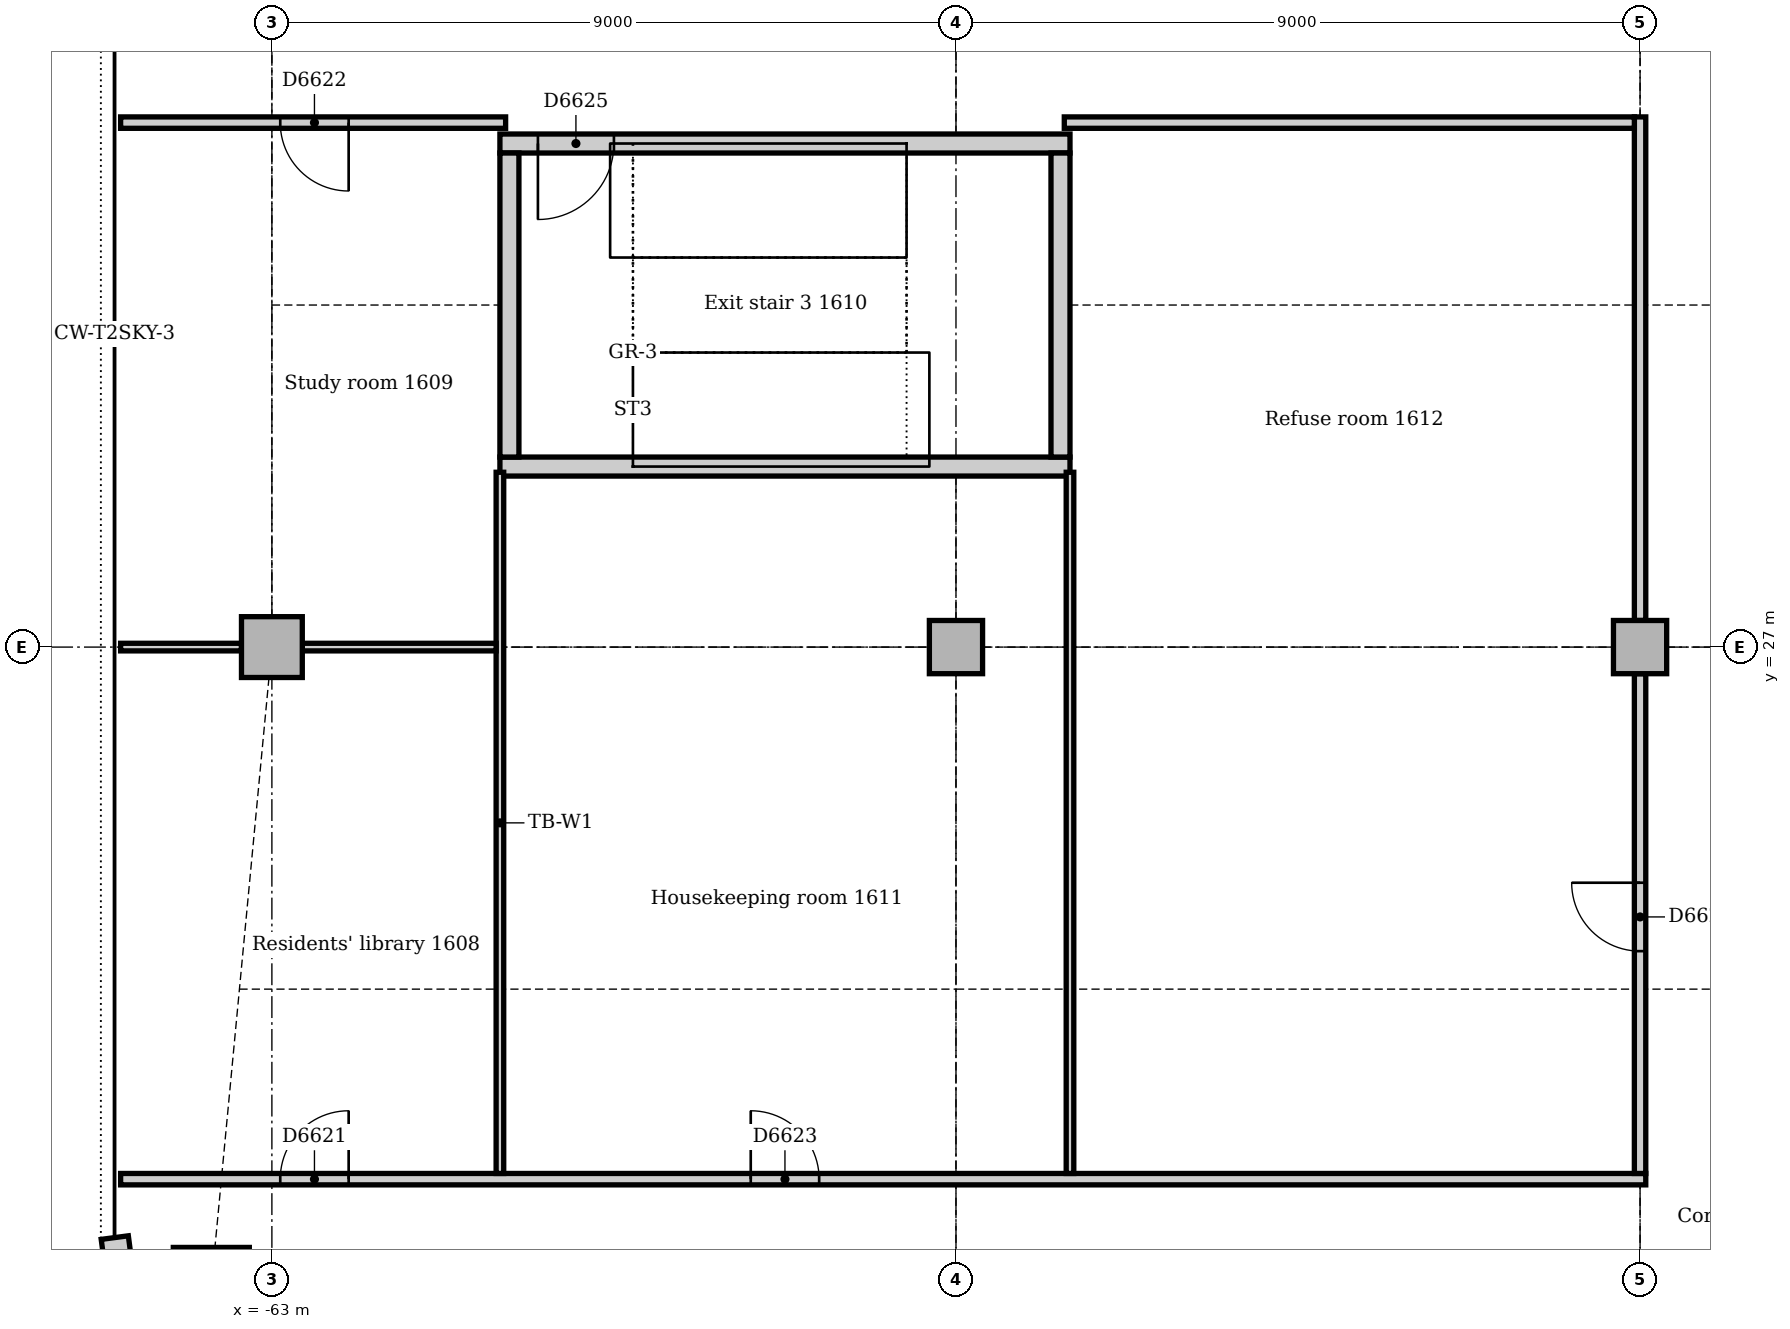
"""IFC4 building model, lengths in metres.
Left out: names, types, materials, properties, quantities, classifications, styles, units other than length and angle.
Written with IfcOpenShell. Run it as: python <this file> out.ifc"""

import sys

from ifc_helpers import new_model, si_unit, direction, frame, frame_2d, origin, origin_2d, place, context, subcontext, project, spatial, rectangle, extrude, element, fill, save


model = new_model("IFC4")
c1 = context("Model", 3, precision=1e-05, world=origin(), true_north=direction((0.0, 1.0)))
c2 = subcontext(c1, "Body", "Model", "MODEL_VIEW")
j1 = project(units=[si_unit("LENGTHUNIT", "METRE"), si_unit("PLANEANGLEUNIT", "RADIAN")], contexts=[c1])
p1 = place(None, origin())
s1 = spatial("IfcSite", under=j1, at=p1, CompositionType="ELEMENT")
p2 = place(p1, origin())
s2 = spatial("IfcBuilding", under=s1, at=p2, CompositionType="ELEMENT")
p3 = place(p2, frame((0.0, 0.0, 71.0)))
s3 = spatial("IfcBuildingStorey", under=s2, at=p3, CompositionType="ELEMENT", Elevation=71.0)
p4 = place(p3, frame((-60.0, 29.375, 0.0), z_axis=(0.0, 0.0, 1.0), x_axis=(1.0, 0.0, 0.0)))
e1 = element("IfcWall", 1, at=p4, inside=s3, PredefinedType="SOLIDWALL", context=c2, shape_type="SweptSolid", body=[
    extrude(rectangle(XDim=7.5, YDim=0.25, at=frame_2d((3.75, 0.0))), origin(), (0.0, 0.0, 1.0), 4.0),
])
p5 = place(p3, frame((-52.5, 33.625, 0.0), z_axis=(0.0, 0.0, 1.0), x_axis=(-1.0, 0.0, 0.0)))
e2 = element("IfcWall", 2, at=p5, inside=s3, PredefinedType="SOLIDWALL", context=c2, shape_type="SweptSolid", body=[
    extrude(rectangle(XDim=7.5, YDim=0.25, at=frame_2d((3.75, 0.0))), origin(), (0.0, 0.0, 1.0), 4.0),
])
p6 = place(p5, frame((6.0, 0.0, 0.0)))
e3 = element("IfcOpeningElement", 3, at=p6, cuts=e2, PredefinedType="OPENING", context=c2, shape_type="SweptSolid", body=[
    extrude(rectangle(XDim=1.0, YDim=2.1, at=frame_2d((0.5, 1.05))), frame((0.0, 0.135, 0.0), z_axis=(0.0, -1.0, 0.0), x_axis=(1.0, 0.0, 0.0)), (0.0, 0.0, 1.0), 0.27),
])
for number, where, z_axis, x_axis in (
    (4, (-52.625, 29.5, 0.0), (0.0, 0.0, 1.0), (0.0, 1.0, 0.0)),
    (5, (-59.875, 33.5, 0.0), (0.0, 0.0, 1.0), (0.0, -1.0, 0.0)),
):
    element("IfcWall", number, at=place(p3, frame(where, z_axis=z_axis, x_axis=x_axis)), inside=s3, PredefinedType="SOLIDWALL", context=c2, shape_type="SweptSolid", body=[
        extrude(rectangle(XDim=4.0, YDim=0.25, at=frame_2d((2.0, 0.0))), origin(), (0.0, 0.0, 1.0), 4.0),
    ])
p7 = place(p3, frame((-63.797, 18.602, 0.0), z_axis=(0.0, 0.0, 1.0), x_axis=(1.0, 0.0, 0.0)))
e6 = element("IfcColumn", 6, at=p7, inside=s3, PredefinedType="COLUMN", context=c2, shape_type="SweptSolid", body=[
    extrude(rectangle(XDim=1.0, YDim=1.0, at=origin_2d()), origin(), (0.0, 0.0, 1.0), 3.85),
])
p8 = place(p3, frame((-63.0, 27.0, 0.0), z_axis=(0.0, 0.0, 1.0), x_axis=(1.0, 0.0, 0.0)))
e7 = element("IfcColumn", 7, at=p8, inside=s3, PredefinedType="COLUMN", context=c2, shape_type="SweptSolid", body=[
    extrude(rectangle(XDim=0.8, YDim=0.8, at=origin_2d()), origin(), (0.0, 0.0, 1.0), 3.85),
])
for number, where, z_axis, x_axis in (
    (8, (-54.0, 27.0, 0.0), (0.0, 0.0, 1.0), (1.0, 0.0, 0.0)),
    (9, (-45.0, 27.0, 0.0), (0.0, 0.0, 1.0), (1.0, 0.0, 0.0)),
):
    element("IfcColumn", number, at=place(p3, frame(where, z_axis=z_axis, x_axis=x_axis)), inside=s3, PredefinedType="COLUMN", context=c2, shape_type="SweptSolid", body=[
        extrude(rectangle(XDim=0.7, YDim=0.7, at=origin_2d()), origin(), (0.0, 0.0, 1.0), 3.85),
    ])
p9 = place(p3, frame((-65.067, 19.231, 0.0), z_axis=(0.0, 0.0, 1.0), x_axis=(0.13055608231, -0.99144092581, 0.0)))
e10 = element("IfcWall", 10, at=p9, inside=s3, PredefinedType="STANDARD", context=c2, shape_type="SweptSolid", body=[
    extrude(rectangle(XDim=0.713, YDim=0.36, at=frame_2d((0.356, 0.0))), origin(), (0.0, 0.0, 1.0), 3.85),
])
p10 = place(p3, frame((-64.99, 20.0, 0.0), z_axis=(0.0, 0.0, 1.0), x_axis=(1.0, 0.0, 0.0)))
e11 = element("IfcWall", 11, at=p10, inside=s3, PredefinedType="PARTITIONING", context=c2, shape_type="SweptSolid", body=[
    extrude(rectangle(XDim=20.065, YDim=0.15, at=frame_2d((10.033, 0.0))), origin(), (0.0, 0.0, 1.0), 3.85),
])
p11 = place(p10, frame((2.1, 0.0, 0.0)))
e12 = element("IfcOpeningElement", 12, at=p11, cuts=e11, PredefinedType="OPENING", context=c2, shape_type="SweptSolid", body=[
    extrude(rectangle(XDim=0.9, YDim=2.1, at=frame_2d((0.45, 1.05))), frame((0.0, 0.085, 0.0), z_axis=(0.0, -1.0, 0.0), x_axis=(1.0, 0.0, 0.0)), (0.0, 0.0, 1.0), 0.17),
])
p12 = place(p10, frame((8.29, 0.0, 0.0)))
e13 = element("IfcOpeningElement", 13, at=p12, cuts=e11, PredefinedType="OPENING", context=c2, shape_type="SweptSolid", body=[
    extrude(rectangle(XDim=0.9, YDim=2.1, at=frame_2d((0.45, 1.05))), frame((0.0, 0.085, 0.0), z_axis=(0.0, -1.0, 0.0), x_axis=(1.0, 0.0, 0.0)), (0.0, 0.0, 1.0), 0.17),
])
p13 = place(p3, frame((-45.0, 20.075, 0.0), z_axis=(0.0, 0.0, 1.0), x_axis=(0.0, 1.0, 0.0)))
e14 = element("IfcWall", 14, at=p13, inside=s3, PredefinedType="PARTITIONING", context=c2, shape_type="SweptSolid", body=[
    extrude(rectangle(XDim=6.575, YDim=0.15, at=frame_2d((3.288, 0.0))), origin(), (0.0, 0.0, 1.0), 3.256),
])
p14 = place(p13, frame((2.925, 0.0, 0.0)))
e15 = element("IfcOpeningElement", 15, at=p14, cuts=e14, PredefinedType="OPENING", context=c2, shape_type="SweptSolid", body=[
    extrude(rectangle(XDim=0.9, YDim=2.1, at=frame_2d((0.45, 1.05))), frame((0.0, 0.085, 0.0), z_axis=(0.0, -1.0, 0.0), x_axis=(1.0, 0.0, 0.0)), (0.0, 0.0, 1.0), 0.17),
])
p15 = place(p3, frame((-45.0, 27.35, 0.0), z_axis=(0.0, 0.0, 1.0), x_axis=(0.0, 1.0, 0.0)))
e16 = element("IfcWall", 16, at=p15, inside=s3, PredefinedType="PARTITIONING", context=c2, shape_type="SweptSolid", body=[
    extrude(rectangle(XDim=6.625, YDim=0.15, at=frame_2d((3.312, 0.0))), origin(), (0.0, 0.0, 1.0), 3.256),
])
p16 = place(p3, frame((-52.575, 33.9, 0.0), z_axis=(0.0, 0.0, 1.0), x_axis=(1.0, 0.0, 0.0)))
e17 = element("IfcWall", 17, at=p16, inside=s3, PredefinedType="PARTITIONING", context=c2, shape_type="SweptSolid", body=[
    extrude(rectangle(XDim=7.5, YDim=0.15, at=frame_2d((3.75, 0.0))), origin(), (0.0, 0.0, 1.0), 3.85),
])
p17 = place(p3, frame((-64.99, 33.9, 0.0), z_axis=(0.0, 0.0, 1.0), x_axis=(1.0, 0.0, 0.0)))
e18 = element("IfcWall", 18, at=p17, inside=s3, PredefinedType="PARTITIONING", context=c2, shape_type="SweptSolid", body=[
    extrude(rectangle(XDim=5.065, YDim=0.15, at=frame_2d((2.533, 0.0))), origin(), (0.0, 0.0, 1.0), 3.85),
])
p18 = place(p17, frame((2.1, 0.0, 0.0)))
e19 = element("IfcOpeningElement", 19, at=p18, cuts=e18, PredefinedType="OPENING", context=c2, shape_type="SweptSolid", body=[
    extrude(rectangle(XDim=0.9, YDim=2.1, at=frame_2d((0.45, 1.05))), frame((0.0, 0.085, 0.0), z_axis=(0.0, -1.0, 0.0), x_axis=(1.0, 0.0, 0.0)), (0.0, 0.0, 1.0), 0.17),
])
for number, where, z_axis, x_axis in (
    (20, (-60.0, 20.075, 0.0), (0.0, 0.0, 1.0), (0.0, 1.0, 0.0)),
    (21, (-52.5, 20.075, 0.0), (0.0, 0.0, 1.0), (0.0, 1.0, 0.0)),
):
    element("IfcWall", number, at=place(p3, frame(where, z_axis=z_axis, x_axis=x_axis)), inside=s3, PredefinedType="PARTITIONING", context=c2, shape_type="SweptSolid", body=[
        extrude(rectangle(XDim=9.225, YDim=0.1, at=frame_2d((4.612, 0.0))), origin(), (0.0, 0.0, 1.0), 3.85),
    ])
p19 = place(p3, frame((-62.6, 27.0, 0.0), z_axis=(0.0, 0.0, 1.0), x_axis=(1.0, 0.0, 0.0)))
e22 = element("IfcWall", 22, at=p19, inside=s3, PredefinedType="PARTITIONING", context=c2, shape_type="SweptSolid", body=[
    extrude(rectangle(XDim=2.55, YDim=0.1, at=frame_2d((1.275, 0.0))), origin(), (0.0, 0.0, 1.0), 3.158),
])
p20 = place(p3, frame((-64.99, 27.0, 0.0), z_axis=(0.0, 0.0, 1.0), x_axis=(1.0, 0.0, 0.0)))
e23 = element("IfcWall", 23, at=p20, inside=s3, PredefinedType="PARTITIONING", context=c2, shape_type="SweptSolid", body=[
    extrude(rectangle(XDim=1.59, YDim=0.1, at=frame_2d((0.795, 0.0))), origin(), (0.0, 0.0, 1.0), 3.85),
])
p21 = place(p11, origin())
e24 = element("IfcDoor", 24, at=p21, inside=s3, OperationType="SINGLE_SWING_RIGHT", PredefinedType="DOOR", context=c2, shape_type="SweptSolid", body=[
    extrude(rectangle(XDim=0.9, YDim=2.1, at=frame_2d((0.45, 1.05))), frame((0.0, 0.025, 0.0), z_axis=(0.0, -1.0, 0.0), x_axis=(1.0, 0.0, 0.0)), (0.0, 0.0, 1.0), 0.05),
])
fill(e12, e24)
p22 = place(p18, frame((0.9, 0.0, 0.0), z_axis=(0.0, 0.0, 1.0), x_axis=(-1.0, 0.0, 0.0)))
e25 = element("IfcDoor", 25, at=p22, inside=s3, OperationType="SINGLE_SWING_LEFT", PredefinedType="DOOR", context=c2, shape_type="SweptSolid", body=[
    extrude(rectangle(XDim=0.9, YDim=2.1, at=frame_2d((0.45, 1.05))), frame((0.0, 0.025, 0.0), z_axis=(0.0, -1.0, 0.0), x_axis=(1.0, 0.0, 0.0)), (0.0, 0.0, 1.0), 0.05),
])
fill(e19, e25)
p23 = place(p12, origin())
e26 = element("IfcDoor", 26, at=p23, inside=s3, OperationType="SINGLE_SWING_LEFT", PredefinedType="DOOR", context=c2, shape_type="SweptSolid", body=[
    extrude(rectangle(XDim=0.9, YDim=2.1, at=frame_2d((0.45, 1.05))), frame((0.0, 0.025, 0.0), z_axis=(0.0, -1.0, 0.0), x_axis=(1.0, 0.0, 0.0)), (0.0, 0.0, 1.0), 0.05),
])
fill(e13, e26)
p24 = place(p14, origin())
e27 = element("IfcDoor", 27, at=p24, inside=s3, OperationType="SINGLE_SWING_RIGHT", PredefinedType="DOOR", context=c2, shape_type="SweptSolid", body=[
    extrude(rectangle(XDim=0.9, YDim=2.1, at=frame_2d((0.45, 1.05))), frame((0.0, 0.025, 0.0), z_axis=(0.0, -1.0, 0.0), x_axis=(1.0, 0.0, 0.0)), (0.0, 0.0, 1.0), 0.05),
])
fill(e15, e27)
p25 = place(p6, origin())
e28 = element("IfcDoor", 28, at=p25, inside=s3, OperationType="SINGLE_SWING_RIGHT", PredefinedType="DOOR", context=c2, shape_type="SweptSolid", body=[
    extrude(rectangle(XDim=1.0, YDim=2.1, at=frame_2d((0.5, 1.05))), frame((0.0, 0.025, 0.0), z_axis=(0.0, -1.0, 0.0), x_axis=(1.0, 0.0, 0.0)), (0.0, 0.0, 1.0), 0.05),
])
fill(e3, e28)
save(model, sys.argv[1])
